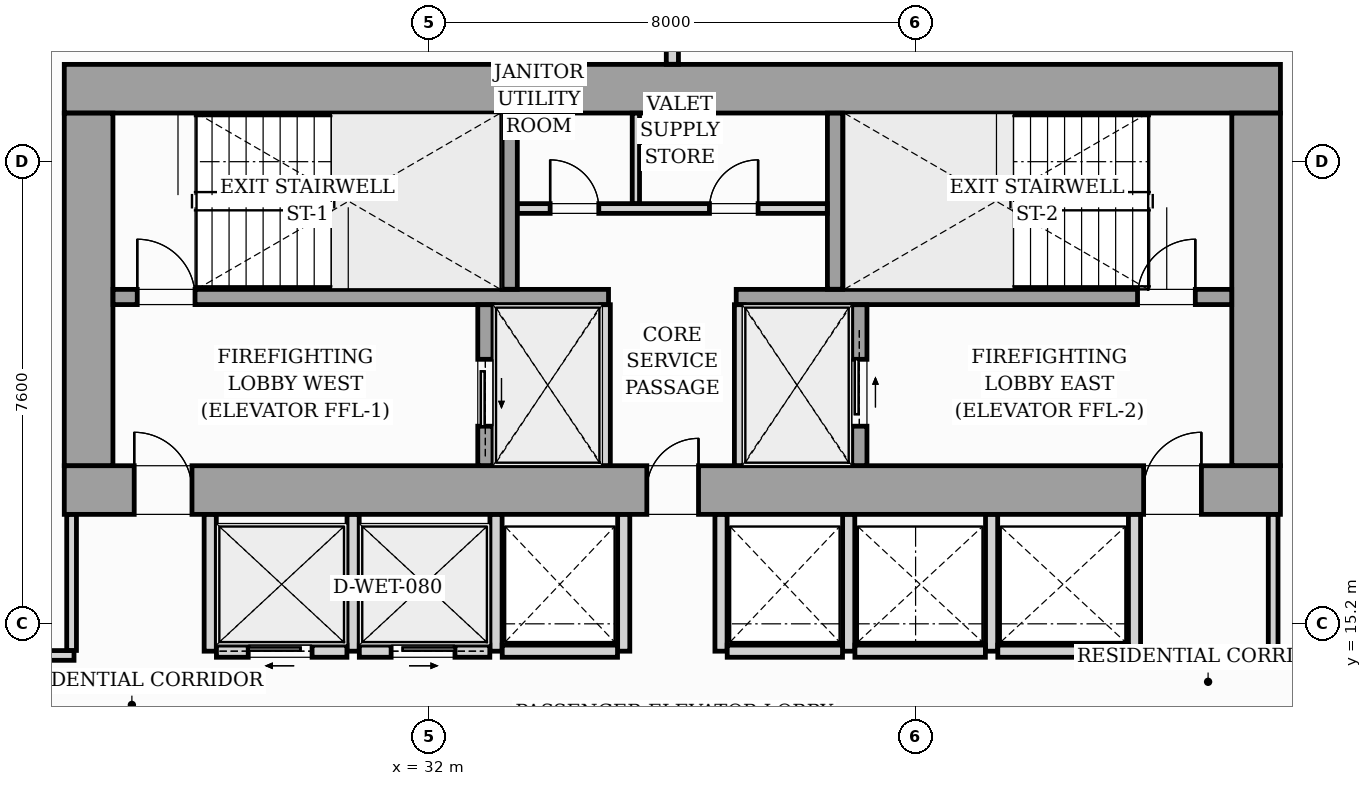
"""IFC4 building model, lengths in metres.
Left out: names, types, materials, properties, quantities, classifications, styles, units other than length and angle.
Written with IfcOpenShell. Run it as: python <this file> out.ifc"""

import sys

from ifc_helpers import new_model, si_unit, direction, frame, frame_2d, origin, origin_2d, place, context, subcontext, project, spatial, rectangle, i_section, extrude, source, transform, mapped, element, fill, save


model = new_model("IFC4")
c1 = context("Model", 3, precision=1e-05, world=origin(), true_north=direction((0.0, 1.0)))
c2 = subcontext(c1, "Body", "Model", "MODEL_VIEW")
j1 = project(units=[si_unit("LENGTHUNIT", "METRE"), si_unit("PLANEANGLEUNIT", "RADIAN")], contexts=[c1])
p1 = place(None, origin())
s1 = spatial("IfcSite", under=j1, at=p1, CompositionType="ELEMENT")
p2 = place(p1, origin())
s2 = spatial("IfcBuilding", under=s1, at=p2, CompositionType="ELEMENT")
p3 = place(p2, frame((0.0, 0.0, 45.4)))
s3 = spatial("IfcBuildingStorey", under=s2, at=p3, CompositionType="ELEMENT", Elevation=45.4)
m1 = source(origin(), c2, "Body", "SweptSolid", [
    extrude(i_section(OverallWidth=0.437, OverallDepth=0.514, WebThickness=0.061, FlangeThickness=0.097, FilletRadius=0.018, at=origin_2d()), origin(), (0.0, 0.0, 1.0), 3.196),
])
for number, where, z_axis, x_axis in (
    (1, (26.4, 17.4, 0.002), (0.0, 0.0, 1.0), (1.0, 0.0, 0.0)),
    (2, (33.12, 17.4, 0.002), (0.0, 0.0, 1.0), (1.0, 0.0, 0.0)),
    (3, (38.88, 17.4, 0.002), (0.0, 0.0, 1.0), (1.0, 0.0, 0.0)),
    (4, (45.6, 17.4, 0.002), (0.0, 0.0, 1.0), (1.0, 0.0, 0.0)),
    (5, (26.4, 24.0, 0.002), (0.0, 0.0, 1.0), (1.0, 0.0, 0.0)),
    (6, (33.12, 24.0, 0.002), (0.0, 0.0, 1.0), (1.0, 0.0, 0.0)),
    (7, (38.88, 24.0, 0.002), (0.0, 0.0, 1.0), (1.0, 0.0, 0.0)),
    (8, (45.6, 24.0, 0.002), (0.0, 0.0, 1.0), (1.0, 0.0, 0.0)),
):
    element("IfcColumn", number, at=place(p3, frame(where, z_axis=z_axis, x_axis=x_axis)), inside=s3, PredefinedType="PILASTER", context=c2, shape_type="MappedRepresentation", body=[
        mapped(m1, transform((0.0, 0.0, 0.0), scale=1.0)),
    ])
p4 = place(p3, frame((26.0, 17.4, 0.0), z_axis=(0.0, 0.0, 1.0), x_axis=(1.0, 0.0, 0.0)))
e9 = element("IfcWall", 9, at=p4, inside=s3, PredefinedType="SHEAR", context=c2, shape_type="SweptSolid", body=[
    extrude(rectangle(XDim=20.0, YDim=0.8, at=frame_2d((10.0, 0.0))), origin(), (0.0, 0.0, 1.0), 3.2),
])
p5 = place(p4, frame((1.15, 0.0, 0.0)))
e10 = element("IfcOpeningElement", 10, at=p5, cuts=e9, PredefinedType="OPENING", context=c2, shape_type="SweptSolid", body=[
    extrude(rectangle(XDim=0.95, YDim=2.06, at=frame_2d((0.475, 1.03))), frame((0.0, 0.41, 0.0), z_axis=(0.0, -1.0, 0.0), x_axis=(1.0, 0.0, 0.0)), (0.0, 0.0, 1.0), 0.82),
])
p6 = place(p4, frame((9.58, 0.0, 0.0)))
e11 = element("IfcOpeningElement", 11, at=p6, cuts=e9, PredefinedType="OPENING", context=c2, shape_type="SweptSolid", body=[
    extrude(rectangle(XDim=0.85, YDim=2.0, at=frame_2d((0.425, 1.0))), frame((0.0, 0.41, 0.0), z_axis=(0.0, -1.0, 0.0), x_axis=(1.0, 0.0, 0.0)), (0.0, 0.0, 1.0), 0.82),
])
p7 = place(p4, frame((17.75, 0.0, 0.0)))
e12 = element("IfcOpeningElement", 12, at=p7, cuts=e9, PredefinedType="OPENING", context=c2, shape_type="SweptSolid", body=[
    extrude(rectangle(XDim=0.95, YDim=2.06, at=frame_2d((0.475, 1.03))), frame((0.0, 0.41, 0.0), z_axis=(0.0, -1.0, 0.0), x_axis=(1.0, 0.0, 0.0)), (0.0, 0.0, 1.0), 0.82),
])
p8 = place(p3, frame((26.0, 24.0, 0.0), z_axis=(0.0, 0.0, 1.0), x_axis=(1.0, 0.0, 0.0)))
e13 = element("IfcWall", 13, at=p8, inside=s3, PredefinedType="SHEAR", context=c2, shape_type="SweptSolid", body=[
    extrude(rectangle(XDim=20.0, YDim=0.8, at=frame_2d((10.0, 0.0))), origin(), (0.0, 0.0, 1.0), 3.2),
])
for number, where, z_axis, x_axis in (
    (14, (26.4, 17.802, 0.0), (0.0, 0.0, 1.0), (0.0, 1.0, 0.0)),
    (15, (45.6, 17.802, 0.0), (0.0, 0.0, 1.0), (0.0, 1.0, 0.0)),
):
    element("IfcWall", number, at=place(p3, frame(where, z_axis=z_axis, x_axis=x_axis)), inside=s3, PredefinedType="SHEAR", context=c2, shape_type="SweptSolid", body=[
        extrude(rectangle(XDim=5.796, YDim=0.8, at=frame_2d((2.898, 0.0))), origin(), (0.0, 0.0, 1.0), 3.2),
    ])
p9 = place(p3, frame((26.802, 20.575, 0.0), z_axis=(0.0, 0.0, 1.0), x_axis=(1.0, 0.0, 0.0)))
e16 = element("IfcWall", 16, at=p9, inside=s3, PredefinedType="SOLIDWALL", context=c2, shape_type="SweptSolid", body=[
    extrude(rectangle(XDim=8.148, YDim=0.25, at=frame_2d((4.074, 0.0))), origin(), (0.0, 0.0, 1.0), 3.2),
])
p10 = place(p9, frame((0.398, 0.0, 0.0)))
e17 = element("IfcOpeningElement", 17, at=p10, cuts=e16, PredefinedType="OPENING", context=c2, shape_type="SweptSolid", body=[
    extrude(rectangle(XDim=0.95, YDim=2.06, at=frame_2d((0.475, 1.03))), frame((0.0, 0.135, 0.0), z_axis=(0.0, -1.0, 0.0), x_axis=(1.0, 0.0, 0.0)), (0.0, 0.0, 1.0), 0.27),
])
p11 = place(p3, frame((37.05, 20.575, 0.0), z_axis=(0.0, 0.0, 1.0), x_axis=(1.0, 0.0, 0.0)))
e18 = element("IfcWall", 18, at=p11, inside=s3, PredefinedType="SOLIDWALL", context=c2, shape_type="SweptSolid", body=[
    extrude(rectangle(XDim=8.148, YDim=0.25, at=frame_2d((4.074, 0.0))), origin(), (0.0, 0.0, 1.0), 3.2),
])
p12 = place(p11, frame((6.6, 0.0, 0.0)))
e19 = element("IfcOpeningElement", 19, at=p12, cuts=e18, PredefinedType="OPENING", context=c2, shape_type="SweptSolid", body=[
    extrude(rectangle(XDim=0.95, YDim=2.06, at=frame_2d((0.475, 1.03))), frame((0.0, 0.135, 0.0), z_axis=(0.0, -1.0, 0.0), x_axis=(1.0, 0.0, 0.0)), (0.0, 0.0, 1.0), 0.27),
])
for number, where, z_axis, x_axis in (
    (20, (33.325, 20.702, 0.0), (0.0, 0.0, 1.0), (0.0, 1.0, 0.0)),
    (21, (38.675, 20.702, 0.0), (0.0, 0.0, 1.0), (0.0, 1.0, 0.0)),
):
    element("IfcWall", number, at=place(p3, frame(where, z_axis=z_axis, x_axis=x_axis)), inside=s3, PredefinedType="SOLIDWALL", context=c2, shape_type="SweptSolid", body=[
        extrude(rectangle(XDim=2.896, YDim=0.25, at=frame_2d((1.448, 0.0))), origin(), (0.0, 0.0, 1.0), 3.2),
    ])
p13 = place(p3, frame((32.925, 17.802, 0.0), z_axis=(0.0, 0.0, 1.0), x_axis=(0.0, 1.0, 0.0)))
e22 = element("IfcWall", 22, at=p13, inside=s3, PredefinedType="SOLIDWALL", context=c2, shape_type="SweptSolid", body=[
    extrude(rectangle(XDim=2.646, YDim=0.25, at=frame_2d((1.323, 0.0))), origin(), (0.0, 0.0, 1.0), 3.2),
])
p14 = place(p13, frame((0.648, 0.0, 0.0)))
e23 = element("IfcOpeningElement", 23, at=p14, cuts=e22, PredefinedType="OPENING", context=c2, shape_type="SweptSolid", body=[
    extrude(rectangle(XDim=1.1, YDim=2.08, at=frame_2d((0.55, 1.04))), frame((0.0, 0.135, 0.0), z_axis=(0.0, -1.0, 0.0), x_axis=(1.0, 0.0, 0.0)), (0.0, 0.0, 1.0), 0.27),
])
for number, where, z_axis, x_axis in (
    (24, (34.9, 17.802, 0.0), (0.0, 0.0, 1.0), (0.0, 1.0, 0.0)),
    (25, (37.1, 17.802, 0.0), (0.0, 0.0, 1.0), (0.0, 1.0, 0.0)),
):
    element("IfcWall", number, at=place(p3, frame(where, z_axis=z_axis, x_axis=x_axis)), inside=s3, PredefinedType="PARTITIONING", context=c2, shape_type="SweptSolid", body=[
        extrude(rectangle(XDim=2.646, YDim=0.16, at=frame_2d((1.323, 0.0))), origin(), (0.0, 0.0, 1.0), 2.94),
    ])
p15 = place(p3, frame((39.075, 17.802, 0.0), z_axis=(0.0, 0.0, 1.0), x_axis=(0.0, 1.0, 0.0)))
e26 = element("IfcWall", 26, at=p15, inside=s3, PredefinedType="SOLIDWALL", context=c2, shape_type="SweptSolid", body=[
    extrude(rectangle(XDim=2.646, YDim=0.25, at=frame_2d((1.323, 0.0))), origin(), (0.0, 0.0, 1.0), 3.2),
])
p16 = place(p15, frame((0.648, 0.0, 0.0)))
e27 = element("IfcOpeningElement", 27, at=p16, cuts=e26, PredefinedType="OPENING", context=c2, shape_type="SweptSolid", body=[
    extrude(rectangle(XDim=1.1, YDim=2.08, at=frame_2d((0.55, 1.04))), frame((0.0, 0.135, 0.0), z_axis=(0.0, -1.0, 0.0), x_axis=(1.0, 0.0, 0.0)), (0.0, 0.0, 1.0), 0.27),
])
p17 = place(p3, frame((33.452, 22.03, 0.0), z_axis=(0.0, 0.0, 1.0), x_axis=(1.0, 0.0, 0.0)))
e28 = element("IfcWall", 28, at=p17, inside=s3, PredefinedType="PARTITIONING", context=c2, shape_type="SweptSolid", body=[
    extrude(rectangle(XDim=5.096, YDim=0.16, at=frame_2d((2.548, 0.0))), origin(), (0.0, 0.0, 1.0), 2.94),
])
p18 = place(p17, frame((0.538, 0.0, 0.0)))
e29 = element("IfcOpeningElement", 29, at=p18, cuts=e28, PredefinedType="OPENING", context=c2, shape_type="SweptSolid", body=[
    extrude(rectangle(XDim=0.8, YDim=2.05, at=frame_2d((0.4, 1.025))), frame((0.0, 0.09, 0.0), z_axis=(0.0, -1.0, 0.0), x_axis=(1.0, 0.0, 0.0)), (0.0, 0.0, 1.0), 0.18),
])
p19 = place(p17, frame((3.158, 0.0, 0.0)))
e30 = element("IfcOpeningElement", 30, at=p19, cuts=e28, PredefinedType="OPENING", context=c2, shape_type="SweptSolid", body=[
    extrude(rectangle(XDim=0.8, YDim=2.05, at=frame_2d((0.4, 1.025))), frame((0.0, 0.09, 0.0), z_axis=(0.0, -1.0, 0.0), x_axis=(1.0, 0.0, 0.0)), (0.0, 0.0, 1.0), 0.18),
])
p20 = place(p3, frame((35.4, 22.112, 0.0), z_axis=(0.0, 0.0, 1.0), x_axis=(0.0, 1.0, 0.0)))
e31 = element("IfcWall", 31, at=p20, inside=s3, PredefinedType="PARTITIONING", context=c2, shape_type="SweptSolid", body=[
    extrude(rectangle(XDim=1.486, YDim=0.12, at=frame_2d((0.743, 0.0))), origin(), (0.0, 0.0, 1.0), 2.94),
])
for number, where, z_axis, x_axis in (
    (32, (28.4, 14.75, 0.0), (0.0, 0.0, 1.0), (0.0, 1.0, 0.0)),
    (33, (30.75, 14.75, 0.0), (0.0, 0.0, 1.0), (0.0, 1.0, 0.0)),
    (34, (33.1, 14.75, 0.0), (0.0, 0.0, 1.0), (0.0, 1.0, 0.0)),
):
    element("IfcWall", number, at=place(p3, frame(where, z_axis=z_axis, x_axis=x_axis)), inside=s3, PredefinedType="PARTITIONING", context=c2, shape_type="SweptSolid", body=[
        extrude(rectangle(XDim=2.248, YDim=0.2, at=frame_2d((1.124, 0.0))), origin(), (0.0, 0.0, 1.0), 2.94),
    ])
p21 = place(p3, frame((28.502, 14.75, 0.0), z_axis=(0.0, 0.0, 1.0), x_axis=(1.0, 0.0, 0.0)))
e35 = element("IfcWall", 35, at=p21, inside=s3, PredefinedType="PARTITIONING", context=c2, shape_type="SweptSolid", body=[
    extrude(rectangle(XDim=2.146, YDim=0.2, at=frame_2d((1.073, 0.0))), origin(), (0.0, 0.0, 1.0), 2.94),
])
p22 = place(p21, frame((0.523, 0.0, 0.0)))
e36 = element("IfcOpeningElement", 36, at=p22, cuts=e35, PredefinedType="OPENING", context=c2, shape_type="SweptSolid", body=[
    extrude(rectangle(XDim=1.05, YDim=2.08, at=frame_2d((0.525, 1.04))), frame((0.0, 0.11, 0.0), z_axis=(0.0, -1.0, 0.0), x_axis=(1.0, 0.0, 0.0)), (0.0, 0.0, 1.0), 0.22),
])
p23 = place(p3, frame((30.852, 14.75, 0.0), z_axis=(0.0, 0.0, 1.0), x_axis=(1.0, 0.0, 0.0)))
e37 = element("IfcWall", 37, at=p23, inside=s3, PredefinedType="PARTITIONING", context=c2, shape_type="SweptSolid", body=[
    extrude(rectangle(XDim=2.146, YDim=0.2, at=frame_2d((1.073, 0.0))), origin(), (0.0, 0.0, 1.0), 2.94),
])
p24 = place(p23, frame((0.523, 0.0, 0.0)))
e38 = element("IfcOpeningElement", 38, at=p24, cuts=e37, PredefinedType="OPENING", context=c2, shape_type="SweptSolid", body=[
    extrude(rectangle(XDim=1.05, YDim=2.08, at=frame_2d((0.525, 1.04))), frame((0.0, 0.11, 0.0), z_axis=(0.0, -1.0, 0.0), x_axis=(1.0, 0.0, 0.0)), (0.0, 0.0, 1.0), 0.22),
])
p25 = place(p3, frame((35.2, 14.75, 0.0), z_axis=(0.0, 0.0, 1.0), x_axis=(0.0, 1.0, 0.0)))
e39 = element("IfcWall", 39, at=p25, inside=s3, PredefinedType="PARTITIONING", context=c2, shape_type="SweptSolid", body=[
    extrude(rectangle(XDim=2.248, YDim=0.2, at=frame_2d((1.124, 0.0))), origin(), (0.0, 0.0, 1.0), 2.94),
])
p26 = place(p3, frame((33.202, 14.75, 0.0), z_axis=(0.0, 0.0, 1.0), x_axis=(1.0, 0.0, 0.0)))
e40 = element("IfcWall", 40, at=p26, inside=s3, PredefinedType="PARTITIONING", context=c2, shape_type="SweptSolid", body=[
    extrude(rectangle(XDim=1.896, YDim=0.2, at=frame_2d((0.948, 0.0))), origin(), (0.0, 0.0, 1.0), 2.94),
])
for number, where, z_axis, x_axis in (
    (41, (36.8, 14.75, 0.0), (0.0, 0.0, 1.0), (0.0, 1.0, 0.0)),
    (42, (38.9, 14.75, 0.0), (0.0, 0.0, 1.0), (0.0, 1.0, 0.0)),
):
    element("IfcWall", number, at=place(p3, frame(where, z_axis=z_axis, x_axis=x_axis)), inside=s3, PredefinedType="PARTITIONING", context=c2, shape_type="SweptSolid", body=[
        extrude(rectangle(XDim=2.248, YDim=0.2, at=frame_2d((1.124, 0.0))), origin(), (0.0, 0.0, 1.0), 2.94),
    ])
p27 = place(p3, frame((36.902, 14.75, 0.0), z_axis=(0.0, 0.0, 1.0), x_axis=(1.0, 0.0, 0.0)))
e43 = element("IfcWall", 43, at=p27, inside=s3, PredefinedType="PARTITIONING", context=c2, shape_type="SweptSolid", body=[
    extrude(rectangle(XDim=1.896, YDim=0.2, at=frame_2d((0.948, 0.0))), origin(), (0.0, 0.0, 1.0), 2.94),
])
for number, where, z_axis, x_axis in (
    (44, (41.25, 14.75, 0.0), (0.0, 0.0, 1.0), (0.0, 1.0, 0.0)),
    (45, (43.6, 14.75, 0.0), (0.0, 0.0, 1.0), (0.0, 1.0, 0.0)),
):
    element("IfcWall", number, at=place(p3, frame(where, z_axis=z_axis, x_axis=x_axis)), inside=s3, PredefinedType="PARTITIONING", context=c2, shape_type="SweptSolid", body=[
        extrude(rectangle(XDim=2.248, YDim=0.2, at=frame_2d((1.124, 0.0))), origin(), (0.0, 0.0, 1.0), 2.94),
    ])
for number, where, z_axis, x_axis in (
    (46, (39.002, 14.75, 0.0), (0.0, 0.0, 1.0), (1.0, 0.0, 0.0)),
    (47, (41.352, 14.75, 0.0), (0.0, 0.0, 1.0), (1.0, 0.0, 0.0)),
):
    element("IfcWall", number, at=place(p3, frame(where, z_axis=z_axis, x_axis=x_axis)), inside=s3, PredefinedType="PARTITIONING", context=c2, shape_type="SweptSolid", body=[
        extrude(rectangle(XDim=2.146, YDim=0.2, at=frame_2d((1.073, 0.0))), origin(), (0.0, 0.0, 1.0), 2.94),
    ])
p28 = place(p3, frame((36.0, 24.402, 0.0), z_axis=(0.0, 0.0, 1.0), x_axis=(0.0, 1.0, 0.0)))
e48 = element("IfcWall", 48, at=p28, inside=s3, PredefinedType="PARTITIONING", context=c2, shape_type="SweptSolid", body=[
    extrude(rectangle(XDim=3.218, YDim=0.2, at=frame_2d((1.609, 0.0))), origin(), (0.0, 0.0, 1.0), 2.94),
])
p29 = place(p3, frame((15.282, 14.68, 0.0), z_axis=(0.0, 0.0, 1.0), x_axis=(1.0, 0.0, 0.0)))
e49 = element("IfcWall", 49, at=p29, inside=s3, PredefinedType="PARTITIONING", context=c2, shape_type="SweptSolid", body=[
    extrude(rectangle(XDim=10.878, YDim=0.16, at=frame_2d((5.439, 0.0))), origin(), (0.0, 0.0, 1.0), 2.94),
])
p30 = place(p29, frame((4.863, 0.0, 0.0)))
e50 = element("IfcOpeningElement", 50, at=p30, cuts=e49, PredefinedType="OPENING", context=c2, shape_type="SweptSolid", body=[
    extrude(rectangle(XDim=0.95, YDim=2.06, at=frame_2d((0.475, 1.03))), frame((0.0, 0.09, 0.0), z_axis=(0.0, -1.0, 0.0), x_axis=(1.0, 0.0, 0.0)), (0.0, 0.0, 1.0), 0.18),
])
p31 = place(p3, frame((26.12, 14.762, 0.0), z_axis=(0.0, 0.0, 1.0), x_axis=(0.0, 1.0, 0.0)))
e51 = element("IfcWall", 51, at=p31, inside=s3, PredefinedType="PARTITIONING", context=c2, shape_type="SweptSolid", body=[
    extrude(rectangle(XDim=2.236, YDim=0.16, at=frame_2d((1.118, 0.0))), origin(), (0.0, 0.0, 1.0), 2.94),
])
p32 = place(p3, frame((45.84, 14.68, 0.0), z_axis=(0.0, 0.0, 1.0), x_axis=(1.0, 0.0, 0.0)))
e52 = element("IfcWall", 52, at=p32, inside=s3, PredefinedType="PARTITIONING", context=c2, shape_type="SweptSolid", body=[
    extrude(rectangle(XDim=4.428, YDim=0.16, at=frame_2d((2.214, 0.0))), origin(), (0.0, 0.0, 1.0), 2.94),
])
p33 = place(p32, frame((1.84, 0.0, 0.0)))
e53 = element("IfcOpeningElement", 53, at=p33, cuts=e52, PredefinedType="OPENING", context=c2, shape_type="SweptSolid", body=[
    extrude(rectangle(XDim=0.95, YDim=2.06, at=frame_2d((0.475, 1.03))), frame((0.0, 0.09, 0.0), z_axis=(0.0, -1.0, 0.0), x_axis=(1.0, 0.0, 0.0)), (0.0, 0.0, 1.0), 0.18),
])
p34 = place(p3, frame((45.88, 14.762, 0.0), z_axis=(0.0, 0.0, 1.0), x_axis=(0.0, 1.0, 0.0)))
e54 = element("IfcWall", 54, at=p34, inside=s3, PredefinedType="PARTITIONING", context=c2, shape_type="SweptSolid", body=[
    extrude(rectangle(XDim=2.236, YDim=0.16, at=frame_2d((1.118, 0.0))), origin(), (0.0, 0.0, 1.0), 2.94),
])
m2 = source(origin(), c2, "Body", "SweptSolid", [
    extrude(rectangle(XDim=0.95, YDim=2.06, at=frame_2d((0.475, 1.03))), frame((0.0, 0.025, 0.0), z_axis=(0.0, -1.0, 0.0), x_axis=(1.0, 0.0, 0.0)), (0.0, 0.0, 1.0), 0.05),
])
p35 = place(p5, origin())
e55 = element("IfcDoor", 55, at=p35, inside=s3, OperationType="SINGLE_SWING_LEFT", PredefinedType="DOOR", context=c2, shape_type="MappedRepresentation", body=[
    mapped(m2, transform((0.0, 0.0, 0.0), scale=1.0)),
])
fill(e10, e55)
m3 = source(origin(), c2, "Body", "SweptSolid", [
    extrude(rectangle(XDim=0.85, YDim=2.0, at=frame_2d((0.425, 1.0))), frame((0.0, 0.025, 0.0), z_axis=(0.0, -1.0, 0.0), x_axis=(1.0, 0.0, 0.0)), (0.0, 0.0, 1.0), 0.05),
])
p36 = place(p6, origin())
e56 = element("IfcDoor", 56, at=p36, inside=s3, OperationType="SINGLE_SWING_RIGHT", PredefinedType="DOOR", context=c2, shape_type="MappedRepresentation", body=[
    mapped(m3, transform((0.0, 0.0, 0.0), scale=1.0)),
])
fill(e11, e56)
p37 = place(p7, origin())
e57 = element("IfcDoor", 57, at=p37, inside=s3, OperationType="SINGLE_SWING_RIGHT", PredefinedType="DOOR", context=c2, shape_type="MappedRepresentation", body=[
    mapped(m2, transform((0.0, 0.0, 0.0), scale=1.0)),
])
fill(e12, e57)
p38 = place(p10, origin())
e58 = element("IfcDoor", 58, at=p38, inside=s3, OperationType="SINGLE_SWING_LEFT", PredefinedType="DOOR", context=c2, shape_type="MappedRepresentation", body=[
    mapped(m2, transform((0.0, 0.0, 0.0), scale=1.0)),
])
fill(e17, e58)
p39 = place(p12, origin())
e59 = element("IfcDoor", 59, at=p39, inside=s3, OperationType="SINGLE_SWING_RIGHT", PredefinedType="DOOR", context=c2, shape_type="MappedRepresentation", body=[
    mapped(m2, transform((0.0, 0.0, 0.0), scale=1.0)),
])
fill(e19, e59)
m4 = source(origin(), c2, "Body", "SweptSolid", [
    extrude(rectangle(XDim=1.1, YDim=2.08, at=frame_2d((0.55, 1.04))), frame((0.0, 0.025, 0.0), z_axis=(0.0, -1.0, 0.0), x_axis=(1.0, 0.0, 0.0)), (0.0, 0.0, 1.0), 0.05),
])
p40 = place(p14, origin())
e60 = element("IfcDoor", 60, at=p40, inside=s3, OperationType="SLIDING_TO_LEFT", PredefinedType="DOOR", context=c2, shape_type="MappedRepresentation", body=[
    mapped(m4, transform((0.0, 0.0, 0.0), scale=1.0)),
])
fill(e23, e60)
p41 = place(p16, origin())
e61 = element("IfcDoor", 61, at=p41, inside=s3, OperationType="SLIDING_TO_RIGHT", PredefinedType="DOOR", context=c2, shape_type="MappedRepresentation", body=[
    mapped(m4, transform((0.0, 0.0, 0.0), scale=1.0)),
])
fill(e27, e61)
m5 = source(origin(), c2, "Body", "SweptSolid", [
    extrude(rectangle(XDim=0.8, YDim=2.05, at=frame_2d((0.4, 1.025))), frame((0.0, 0.025, 0.0), z_axis=(0.0, -1.0, 0.0), x_axis=(1.0, 0.0, 0.0)), (0.0, 0.0, 1.0), 0.05),
])
p42 = place(p18, origin())
e62 = element("IfcDoor", 62, at=p42, inside=s3, OperationType="SINGLE_SWING_LEFT", PredefinedType="DOOR", context=c2, shape_type="MappedRepresentation", body=[
    mapped(m5, transform((0.0, 0.0, 0.0), scale=1.0)),
])
fill(e29, e62)
p43 = place(p19, origin())
e63 = element("IfcDoor", 63, at=p43, inside=s3, OperationType="SINGLE_SWING_RIGHT", PredefinedType="DOOR", context=c2, shape_type="MappedRepresentation", body=[
    mapped(m5, transform((0.0, 0.0, 0.0), scale=1.0)),
])
fill(e30, e63)
m6 = source(origin(), c2, "Body", "SweptSolid", [
    extrude(rectangle(XDim=1.05, YDim=2.08, at=frame_2d((0.525, 1.04))), frame((0.0, 0.025, 0.0), z_axis=(0.0, -1.0, 0.0), x_axis=(1.0, 0.0, 0.0)), (0.0, 0.0, 1.0), 0.05),
])
p44 = place(p22, origin())
e64 = element("IfcDoor", 64, at=p44, inside=s3, OperationType="SLIDING_TO_LEFT", PredefinedType="DOOR", context=c2, shape_type="MappedRepresentation", body=[
    mapped(m6, transform((0.0, 0.0, 0.0), scale=1.0)),
])
fill(e36, e64)
p45 = place(p24, origin())
e65 = element("IfcDoor", 65, at=p45, inside=s3, OperationType="SLIDING_TO_RIGHT", PredefinedType="DOOR", context=c2, shape_type="MappedRepresentation", body=[
    mapped(m6, transform((0.0, 0.0, 0.0), scale=1.0)),
])
fill(e38, e65)
save(model, sys.argv[1])
